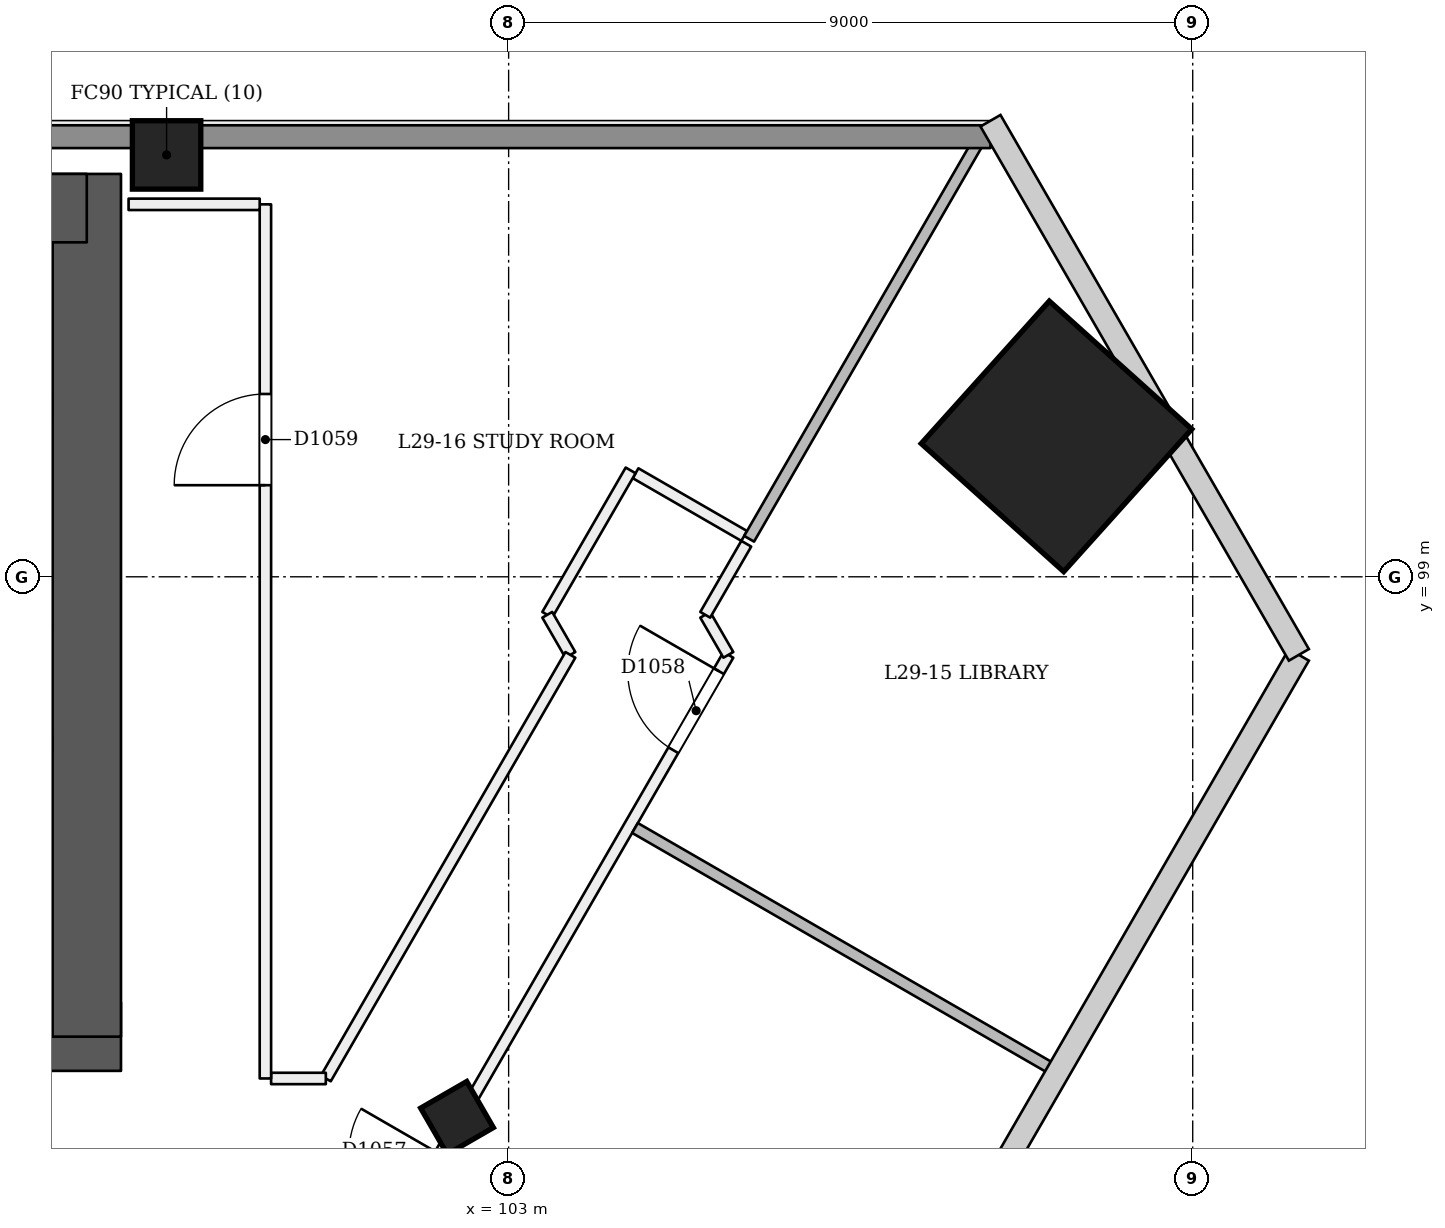
"""IFC4 building model, lengths in metres.
Left out: names, types, materials, properties, quantities, classifications, styles, units other than length and angle.
Written with IfcOpenShell. Run it as: python <this file> out.ifc"""

import sys

from ifc_helpers import new_model, si_unit, direction, frame, frame_2d, origin, origin_2d, place, context, subcontext, project, spatial, rectangle, extrude, element, fill, save


model = new_model("IFC4")
c1 = context("Model", 3, precision=1e-05, world=origin(), true_north=direction((0.0, 1.0)))
c2 = subcontext(c1, "Body", "Model", "MODEL_VIEW")
j1 = project(units=[si_unit("LENGTHUNIT", "METRE"), si_unit("PLANEANGLEUNIT", "RADIAN")], contexts=[c1])
p1 = place(None, origin())
s1 = spatial("IfcSite", under=j1, at=p1, CompositionType="ELEMENT")
p2 = place(p1, origin())
s2 = spatial("IfcBuilding", under=s1, at=p2, CompositionType="ELEMENT")
p3 = place(p2, frame((0.0, 0.0, 115.2)))
s3 = spatial("IfcBuildingStorey", under=s2, at=p3, CompositionType="ELEMENT", Elevation=115.2)
p4 = place(p3, frame((72.55, 92.95, 0.0), z_axis=(0.0, 0.0, 1.0), x_axis=(1.0, 0.0, 0.0)))
e1 = element("IfcWall", 1, at=p4, inside=s3, PredefinedType="SHEAR", context=c2, shape_type="SweptSolid", body=[
    extrude(rectangle(XDim=25.35, YDim=0.9, at=frame_2d((12.675, 0.0))), origin(), (0.0, 0.0, 1.0), 3.6),
])
p5 = place(p4, frame((1.25, 0.0, 0.0)))
e2 = element("IfcOpeningElement", 2, at=p5, cuts=e1, PredefinedType="OPENING", context=c2, shape_type="SweptSolid", body=[
    extrude(rectangle(XDim=1.2, YDim=2.1, at=frame_2d((0.6, 1.05))), frame((0.0, 0.46, 0.0), z_axis=(0.0, -1.0, 0.0), x_axis=(1.0, 0.0, 0.0)), (0.0, 0.0, 1.0), 0.921),
])
p6 = place(p4, frame((3.45, 0.0, 0.0)))
e3 = element("IfcOpeningElement", 3, at=p6, cuts=e1, PredefinedType="OPENING", context=c2, shape_type="SweptSolid", body=[
    extrude(rectangle(XDim=1.2, YDim=2.1, at=frame_2d((0.6, 1.05))), frame((0.0, 0.46, 0.0), z_axis=(0.0, -1.0, 0.0), x_axis=(1.0, 0.0, 0.0)), (0.0, 0.0, 1.0), 0.921),
])
p7 = place(p4, frame((13.45, 0.0, 0.0)))
e4 = element("IfcOpeningElement", 4, at=p7, cuts=e1, PredefinedType="OPENING", context=c2, shape_type="SweptSolid", body=[
    extrude(rectangle(XDim=1.2, YDim=2.1, at=frame_2d((0.6, 1.05))), frame((0.0, 0.46, 0.0), z_axis=(0.0, -1.0, 0.0), x_axis=(1.0, 0.0, 0.0)), (0.0, 0.0, 1.0), 0.921),
])
p8 = place(p4, frame((15.712, 0.0, 0.0)))
e5 = element("IfcOpeningElement", 5, at=p8, cuts=e1, PredefinedType="OPENING", context=c2, shape_type="SweptSolid", body=[
    extrude(rectangle(XDim=1.0, YDim=2.1, at=frame_2d((0.5, 1.05))), frame((0.0, 0.46, 0.0), z_axis=(0.0, -1.0, 0.0), x_axis=(1.0, 0.0, 0.0)), (0.0, 0.0, 1.0), 0.921),
])
p9 = place(p4, frame((18.35, 0.0, 0.0)))
e6 = element("IfcOpeningElement", 6, at=p9, cuts=e1, PredefinedType="OPENING", context=c2, shape_type="SweptSolid", body=[
    extrude(rectangle(XDim=1.0, YDim=2.1, at=frame_2d((0.5, 1.05))), frame((0.0, 0.46, 0.0), z_axis=(0.0, -1.0, 0.0), x_axis=(1.0, 0.0, 0.0)), (0.0, 0.0, 1.0), 0.921),
])
p10 = place(p4, frame((21.938, 0.0, 0.0)))
e7 = element("IfcOpeningElement", 7, at=p10, cuts=e1, PredefinedType="OPENING", context=c2, shape_type="SweptSolid", body=[
    extrude(rectangle(XDim=1.0, YDim=2.1, at=frame_2d((0.5, 1.05))), frame((0.0, 0.46, 0.0), z_axis=(0.0, -1.0, 0.0), x_axis=(1.0, 0.0, 0.0)), (0.0, 0.0, 1.0), 0.921),
])
p11 = place(p3, frame((97.45, 92.95, 0.0), z_axis=(0.0, 0.0, 1.0), x_axis=(0.0, 1.0, 0.0)))
e8 = element("IfcWall", 8, at=p11, inside=s3, PredefinedType="SHEAR", context=c2, shape_type="SweptSolid", body=[
    extrude(rectangle(XDim=11.35, YDim=0.9, at=frame_2d((5.675, 0.0))), origin(), (0.0, 0.0, 1.0), 3.6),
])
p12 = place(p3, frame((97.45, 103.85, 0.0), z_axis=(0.0, 0.0, 1.0), x_axis=(-1.0, 0.0, 0.0)))
e9 = element("IfcWall", 9, at=p12, inside=s3, PredefinedType="SHEAR", context=c2, shape_type="SweptSolid", body=[
    extrude(rectangle(XDim=25.35, YDim=0.9, at=frame_2d((12.675, 0.0))), origin(), (0.0, 0.0, 1.0), 3.6),
])
p13 = place(p3, frame((102.348, 91.835, -0.021), z_axis=(-0.022221406801, 0.038413224561, 0.999014831351), x_axis=(-0.499508300569, -0.866024890386, 0.022188891243)))
e10 = element("IfcColumn", 10, at=p13, inside=s3, PredefinedType="COLUMN", context=c2, shape_type="SweptSolid", body=[
    extrude(rectangle(XDim=0.7, YDim=0.7, at=origin_2d()), origin(), (0.0, 0.0, 1.0), 3.604),
])
p14 = place(p3, frame((110.242, 100.836, 0.0), z_axis=(-0.028401796786, 0.009286506348, 0.999553449666), x_axis=(0.498888878312, -0.866380944014, 0.022224917221)))
e11 = element("IfcColumn", 11, at=p14, inside=s3, PredefinedType="COLUMN", context=c2, shape_type="SweptSolid", body=[
    extrude(rectangle(XDim=2.52, YDim=2.52, at=origin_2d()), origin(), (0.0, 0.0, 1.0), 3.602),
])
p15 = place(p3, frame((98.5, 104.55, 0.0), z_axis=(0.0, 0.0, 1.0), x_axis=(1.0, 0.0, 0.0)))
e12 = element("IfcColumn", 12, at=p15, inside=s3, PredefinedType="COLUMN", context=c2, shape_type="SweptSolid", body=[
    extrude(rectangle(XDim=0.9, YDim=0.9, at=origin_2d()), origin(), (0.0, 0.0, 1.0), 3.6),
])
p16 = place(p3, frame((85.304, 62.316, 0.0), z_axis=(0.0, 0.0, 1.0), x_axis=(0.499997402089, 0.866026903684, 0.0)))
e13 = element("IfcWall", 13, at=p16, inside=s3, PredefinedType="PARTITIONING", context=c2, shape_type="SweptSolid", body=[
    extrude(rectangle(XDim=41.173, YDim=0.15, at=frame_2d((20.586, 0.0))), origin(), (0.0, 0.0, 1.0), 2.75),
])
p17 = place(p16, frame((0.248, 0.0, 0.0)))
e14 = element("IfcOpeningElement", 14, at=p17, cuts=e13, PredefinedType="OPENING", context=c2, shape_type="SweptSolid", body=[
    extrude(rectangle(XDim=1.2, YDim=2.1, at=frame_2d((0.6, 1.05))), frame((0.0, 0.085, 0.0), z_axis=(0.0, -1.0, 0.0), x_axis=(1.0, 0.0, 0.0)), (0.0, 0.0, 1.0), 0.171),
])
p18 = place(p16, frame((8.737, 0.0, 0.0)))
e15 = element("IfcOpeningElement", 15, at=p18, cuts=e13, PredefinedType="OPENING", context=c2, shape_type="SweptSolid", body=[
    extrude(rectangle(XDim=1.2, YDim=2.1, at=frame_2d((0.6, 1.05))), frame((0.0, 0.085, 0.0), z_axis=(0.0, -1.0, 0.0), x_axis=(1.0, 0.0, 0.0)), (0.0, 0.0, 1.0), 0.171),
])
p19 = place(p16, frame((22.237, 0.0, 0.0)))
e16 = element("IfcOpeningElement", 16, at=p19, cuts=e13, PredefinedType="OPENING", context=c2, shape_type="SweptSolid", body=[
    extrude(rectangle(XDim=1.2, YDim=2.1, at=frame_2d((0.6, 1.05))), frame((0.0, 0.085, 0.0), z_axis=(0.0, -1.0, 0.0), x_axis=(1.0, 0.0, 0.0)), (0.0, 0.0, 1.0), 0.171),
])
p20 = place(p16, frame((32.387, 0.0, 0.0)))
e17 = element("IfcOpeningElement", 17, at=p20, cuts=e13, PredefinedType="OPENING", context=c2, shape_type="SweptSolid", body=[
    extrude(rectangle(XDim=1.2, YDim=2.1, at=frame_2d((0.6, 1.05))), frame((0.0, 0.085, 0.0), z_axis=(0.0, -1.0, 0.0), x_axis=(1.0, 0.0, 0.0)), (0.0, 0.0, 1.0), 0.171),
])
p21 = place(p16, frame((39.725, 0.0, 0.0)))
e18 = element("IfcOpeningElement", 18, at=p21, cuts=e13, PredefinedType="OPENING", context=c2, shape_type="SweptSolid", body=[
    extrude(rectangle(XDim=1.2, YDim=2.1, at=frame_2d((0.6, 1.05))), frame((0.0, 0.085, 0.0), z_axis=(0.0, -1.0, 0.0), x_axis=(1.0, 0.0, 0.0)), (0.0, 0.0, 1.0), 0.171),
])
p22 = place(p3, frame((105.891, 97.973, 0.0), z_axis=(0.0, 0.0, 1.0), x_axis=(-0.499849787464, 0.866112111665, 0.0)))
e19 = element("IfcWall", 19, at=p22, inside=s3, PredefinedType="PARTITIONING", context=c2, shape_type="SweptSolid", body=[
    extrude(rectangle(XDim=0.609, YDim=0.15, at=frame_2d((0.304, 0.0))), origin(), (0.0, 0.0, 1.0), 3.15),
])
p23 = place(p3, frame((105.587, 98.5, 0.0), z_axis=(0.0, 0.0, 1.0), x_axis=(0.499957341738, 0.866050031143, 0.0)))
e20 = element("IfcWall", 20, at=p23, inside=s3, PredefinedType="PARTITIONING", context=c2, shape_type="SweptSolid", body=[
    extrude(rectangle(XDim=1.08, YDim=0.15, at=frame_2d((0.54, 0.0))), origin(), (0.0, 0.0, 1.0), 3.15),
])
p24 = place(p3, frame((106.099, 99.538, 0.0), z_axis=(0.0, 0.0, 1.0), x_axis=(-0.866040211805, 0.499974350878, 0.0)))
e21 = element("IfcWall", 21, at=p24, inside=s3, PredefinedType="PARTITIONING", context=c2, shape_type="SweptSolid", body=[
    extrude(rectangle(XDim=1.65, YDim=0.15, at=frame_2d((0.825, 0.0))), origin(), (0.0, 0.0, 1.0), 3.15),
])
p25 = place(p3, frame((104.605, 100.4, 0.0), z_axis=(0.0, 0.0, 1.0), x_axis=(-0.500005024956, -0.866022502605, 0.0)))
e22 = element("IfcWall", 22, at=p25, inside=s3, PredefinedType="PARTITIONING", context=c2, shape_type="SweptSolid", body=[
    extrude(rectangle(XDim=2.194, YDim=0.15, at=frame_2d((1.097, 0.0))), origin(), (0.0, 0.0, 1.0), 3.15),
])
p26 = place(p3, frame((103.508, 98.5, 0.0), z_axis=(0.0, 0.0, 1.0), x_axis=(0.50015062987, -0.86593842012, 0.0)))
e23 = element("IfcWall", 23, at=p26, inside=s3, PredefinedType="PARTITIONING", context=c2, shape_type="SweptSolid", body=[
    extrude(rectangle(XDim=0.609, YDim=0.15, at=frame_2d((0.304, 0.0))), origin(), (0.0, 0.0, 1.0), 3.15),
])
p27 = place(p3, frame((103.812, 97.973, 0.0), z_axis=(0.0, 0.0, 1.0), x_axis=(-0.499995032058, -0.866028272008, 0.0)))
e24 = element("IfcWall", 24, at=p27, inside=s3, PredefinedType="PARTITIONING", context=c2, shape_type="SweptSolid", body=[
    extrude(rectangle(XDim=6.435, YDim=0.15, at=frame_2d((3.218, 0.0))), origin(), (0.0, 0.0, 1.0), 3.15),
])
p28 = place(p3, frame((100.595, 92.4, 0.0), z_axis=(0.0, 0.0, 1.0), x_axis=(-1.0, 0.0, 0.0)))
e25 = element("IfcWall", 25, at=p28, inside=s3, PredefinedType="PARTITIONING", context=c2, shape_type="SweptSolid", body=[
    extrude(rectangle(XDim=0.72, YDim=0.15, at=frame_2d((0.36, 0.0))), origin(), (0.0, 0.0, 1.0), 3.15),
])
p29 = place(p3, frame((99.8, 92.4, 0.0), z_axis=(0.0, 0.0, 1.0), x_axis=(0.0, 1.0, 0.0)))
e26 = element("IfcWall", 26, at=p29, inside=s3, PredefinedType="PARTITIONING", context=c2, shape_type="SweptSolid", body=[
    extrude(rectangle(XDim=11.5, YDim=0.15, at=frame_2d((5.75, 0.0))), origin(), (0.0, 0.0, 1.0), 2.65),
])
p30 = place(p29, frame((7.805, 0.0, 0.0)))
e27 = element("IfcOpeningElement", 27, at=p30, cuts=e26, PredefinedType="OPENING", context=c2, shape_type="SweptSolid", body=[
    extrude(rectangle(XDim=1.2, YDim=2.1, at=frame_2d((0.6, 1.05))), frame((0.0, 0.085, 0.0), z_axis=(0.0, -1.0, 0.0), x_axis=(1.0, 0.0, 0.0)), (0.0, 0.0, 1.0), 0.171),
])
p31 = place(p3, frame((99.725, 103.9, 0.0), z_axis=(0.0, 0.0, 1.0), x_axis=(-1.0, 0.0, 0.0)))
e28 = element("IfcWall", 28, at=p31, inside=s3, PredefinedType="PARTITIONING", context=c2, shape_type="SweptSolid", body=[
    extrude(rectangle(XDim=1.725, YDim=0.15, at=frame_2d((0.863, 0.0))), origin(), (0.0, 0.0, 1.0), 2.65),
])
p32 = place(p3, frame((110.14, 92.533, 0.0), z_axis=(0.0, 0.0, 1.0), x_axis=(-0.866032601554, 0.49998753289, 0.0)))
e29 = element("IfcWall", 29, at=p32, inside=s3, PredefinedType="PARTITIONING", context=c2, shape_type="SweptSolid", body=[
    extrude(rectangle(XDim=6.325, YDim=0.15, at=frame_2d((3.163, 0.0))), origin(), (0.0, 0.0, 1.0), 2.65),
])
p33 = place(p3, frame((109.281, 104.9, 0.0), z_axis=(0.0, 0.0, 1.0), x_axis=(-0.500004896655, -0.866022576681, 0.0)))
e30 = element("IfcWall", 30, at=p33, inside=s3, PredefinedType="PARTITIONING", context=c2, shape_type="SweptSolid", body=[
    extrude(rectangle(XDim=6.235, YDim=0.15, at=frame_2d((3.118, 0.0))), origin(), (0.0, 0.0, 1.0), 2.65),
])
p34 = place(p3, frame((60.661, 104.79, 0.0), z_axis=(0.0, 0.0, 1.0), x_axis=(1.0, 0.0, 0.0)))
e31 = element("IfcWall", 31, at=p34, inside=s3, PredefinedType="SOLIDWALL", context=c2, shape_type="SweptSolid", body=[
    extrude(rectangle(XDim=48.679, YDim=0.3, at=frame_2d((24.339, 0.0))), origin(), (0.0, 0.0, 1.0), 2.65),
])
p35 = place(p21, origin())
e32 = element("IfcDoor", 32, at=p35, inside=s3, OperationType="SINGLE_SWING_RIGHT", PredefinedType="NOTDEFINED", context=c2, shape_type="SweptSolid", body=[
    extrude(rectangle(XDim=1.2, YDim=2.1, at=frame_2d((0.6, 1.05))), frame((0.0, 0.025, 0.0), z_axis=(0.0, -1.0, 0.0), x_axis=(1.0, 0.0, 0.0)), (0.0, 0.0, 1.0), 0.05),
])
fill(e18, e32)
p36 = place(p30, origin())
e33 = element("IfcDoor", 33, at=p36, inside=s3, OperationType="SINGLE_SWING_LEFT", PredefinedType="NOTDEFINED", context=c2, shape_type="SweptSolid", body=[
    extrude(rectangle(XDim=1.2, YDim=2.1, at=frame_2d((0.6, 1.05))), frame((0.0, 0.025, 0.0), z_axis=(0.0, -1.0, 0.0), x_axis=(1.0, 0.0, 0.0)), (0.0, 0.0, 1.0), 0.05),
])
fill(e27, e33)
save(model, sys.argv[1])
